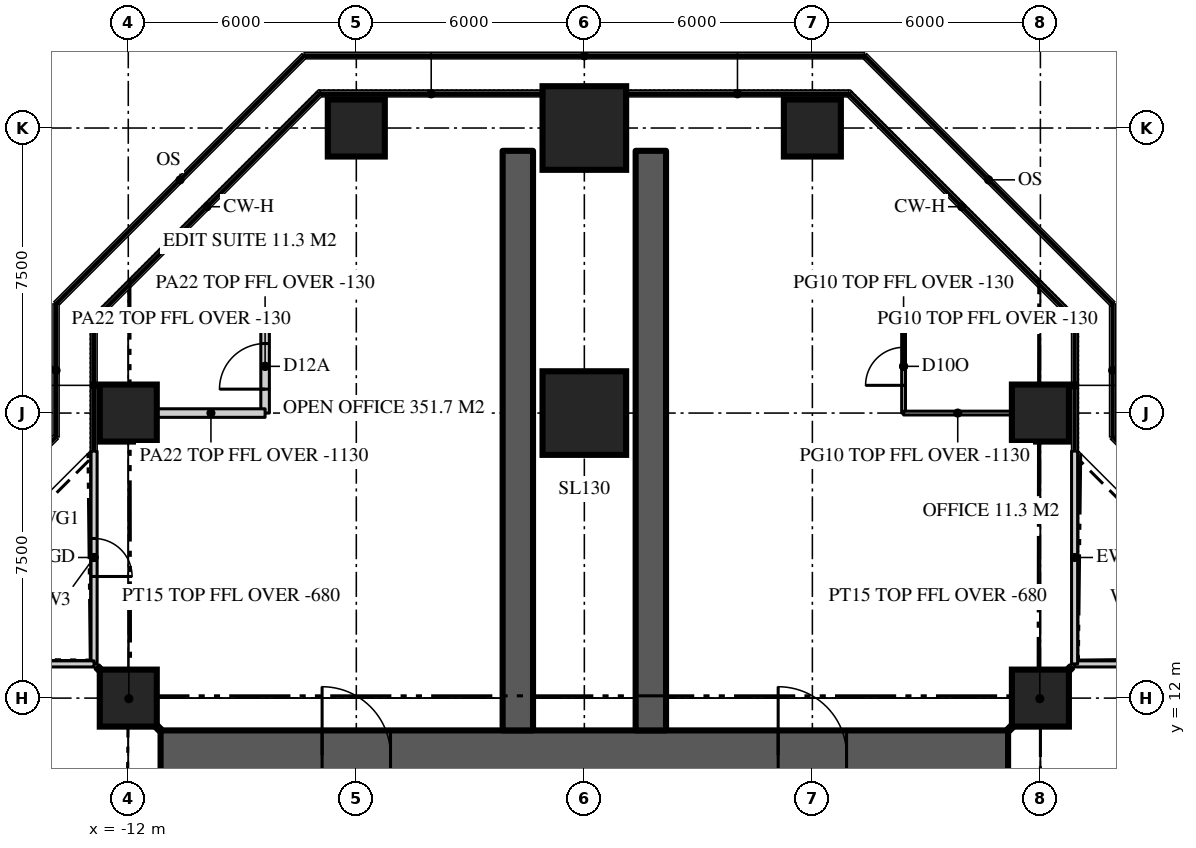
"""IFC4 building model, lengths in metres.
Left out: names, types, materials, properties, quantities, classifications, styles, units other than length and angle.
Written with IfcOpenShell. Run it as: python <this file> out.ifc"""

import sys

from ifc_helpers import new_model, si_unit, direction, frame, frame_2d, origin, origin_2d, place, context, subcontext, project, spatial, rectangle, extrude, element, fill, save


model = new_model("IFC4")
c1 = context("Model", 3, precision=1e-05, world=origin(), true_north=direction((0.0, 1.0)))
c2 = subcontext(c1, "Body", "Model", "MODEL_VIEW")
j1 = project(units=[si_unit("LENGTHUNIT", "METRE"), si_unit("PLANEANGLEUNIT", "RADIAN")], contexts=[c1])
p1 = place(None, origin())
s1 = spatial("IfcSite", under=j1, at=p1, CompositionType="ELEMENT")
p2 = place(p1, origin())
s2 = spatial("IfcBuilding", under=s1, at=p2, CompositionType="ELEMENT")
p3 = place(p2, frame((0.0, 0.0, 251.7)))
s3 = spatial("IfcBuildingStorey", under=s2, at=p3, CompositionType="ELEMENT", Elevation=251.7)
p4 = place(p3, frame((-11.15, 10.5, 0.0), z_axis=(0.0, 0.0, 1.0), x_axis=(1.0, 0.0, 0.0)))
e1 = element("IfcWall", 1, at=p4, inside=s3, PredefinedType="SHEAR", context=c2, shape_type="SweptSolid", body=[
    extrude(rectangle(XDim=22.3, YDim=1.3, at=frame_2d((11.15, 0.0))), origin(), (0.0, 0.0, 1.0), 3.9),
])
p5 = place(p4, frame((4.25, 0.0, 0.0)))
e2 = element("IfcOpeningElement", 2, at=p5, cuts=e1, PredefinedType="OPENING", context=c2, shape_type="SweptSolid", body=[
    extrude(rectangle(XDim=1.8, YDim=2.2, at=frame_2d((0.9, 1.1))), frame((0.0, 0.66, 0.0), z_axis=(0.0, -1.0, 0.0), x_axis=(1.0, 0.0, 0.0)), (0.0, 0.0, 1.0), 1.32),
])
p6 = place(p4, frame((16.25, 0.0, 0.0)))
e3 = element("IfcOpeningElement", 3, at=p6, cuts=e1, PredefinedType="OPENING", context=c2, shape_type="SweptSolid", body=[
    extrude(rectangle(XDim=1.8, YDim=2.2, at=frame_2d((0.9, 1.1))), frame((0.0, 0.66, 0.0), z_axis=(0.0, -1.0, 0.0), x_axis=(1.0, 0.0, 0.0)), (0.0, 0.0, 1.0), 1.32),
])
for number, where, z_axis, x_axis in (
    (4, (1.75, 11.15, 0.0), (0.0, 0.0, 1.0), (0.0, 1.0, 0.0)),
    (5, (-1.75, 11.15, 0.0), (0.0, 0.0, 1.0), (0.0, 1.0, 0.0)),
):
    element("IfcWall", number, at=place(p3, frame(where, z_axis=z_axis, x_axis=x_axis)), inside=s3, PredefinedType="SHEAR", context=c2, shape_type="SweptSolid", body=[
        extrude(rectangle(XDim=15.25, YDim=0.8, at=frame_2d((7.625, 0.0))), origin(), (0.0, 0.0, 1.0), 3.9),
    ])
for number, where, z_axis, x_axis in (
    (6, (-12.0, 12.0, 0.0), (0.0, 0.0, 1.0), (1.0, 0.0, 0.0)),
    (7, (12.0, 12.0, 0.0), (0.0, 0.0, 1.0), (1.0, 0.0, 0.0)),
    (8, (-12.0, 19.5, 0.0), (0.0, 0.0, 1.0), (1.0, 0.0, 0.0)),
):
    element("IfcColumn", number, at=place(p3, frame(where, z_axis=z_axis, x_axis=x_axis)), inside=s3, PredefinedType="COLUMN", context=c2, shape_type="SweptSolid", body=[
        extrude(rectangle(XDim=1.5, YDim=1.5, at=origin_2d()), origin(), (0.0, 0.0, 1.0), 3.9),
    ])
p7 = place(p3, frame((0.0, 19.5, 0.0), z_axis=(0.0, 0.0, 1.0), x_axis=(1.0, 0.0, 0.0)))
e9 = element("IfcColumn", 9, at=p7, inside=s3, PredefinedType="COLUMN", context=c2, shape_type="SweptSolid", body=[
    extrude(rectangle(XDim=2.2, YDim=2.2, at=origin_2d()), origin(), (0.0, 0.0, 1.0), 3.9),
])
for number, where, z_axis, x_axis in (
    (10, (12.0, 19.5, 0.0), (0.0, 0.0, 1.0), (1.0, 0.0, 0.0)),
    (11, (-6.0, 27.0, 0.0), (0.0, 0.0, 1.0), (1.0, 0.0, 0.0)),
):
    element("IfcColumn", number, at=place(p3, frame(where, z_axis=z_axis, x_axis=x_axis)), inside=s3, PredefinedType="COLUMN", context=c2, shape_type="SweptSolid", body=[
        extrude(rectangle(XDim=1.5, YDim=1.5, at=origin_2d()), origin(), (0.0, 0.0, 1.0), 3.9),
    ])
p8 = place(p3, frame((0.0, 27.0, 0.0), z_axis=(0.0, 0.0, 1.0), x_axis=(1.0, 0.0, 0.0)))
e12 = element("IfcColumn", 12, at=p8, inside=s3, PredefinedType="COLUMN", context=c2, shape_type="SweptSolid", body=[
    extrude(rectangle(XDim=2.2, YDim=2.2, at=origin_2d()), origin(), (0.0, 0.0, 1.0), 3.9),
])
p9 = place(p3, frame((6.0, 27.0, 0.0), z_axis=(0.0, 0.0, 1.0), x_axis=(1.0, 0.0, 0.0)))
e13 = element("IfcColumn", 13, at=p9, inside=s3, PredefinedType="COLUMN", context=c2, shape_type="SweptSolid", body=[
    extrude(rectangle(XDim=1.5, YDim=1.5, at=origin_2d()), origin(), (0.0, 0.0, 1.0), 3.9),
])
p10 = place(p3, frame((18.5, 12.9, 0.0), z_axis=(0.0, 0.0, 1.0), x_axis=(-1.0, 0.0, 0.0)))
e14 = element("IfcWall", 14, at=p10, inside=s3, PredefinedType="SOLIDWALL", context=c2, shape_type="SweptSolid", body=[
    extrude(rectangle(XDim=5.6, YDim=0.16, at=frame_2d((2.8, 0.0))), origin(), (0.0, 0.0, 1.0), 3.77),
])
p11 = place(p10, frame((2.3, 0.0, 0.0)))
e15 = element("IfcOpeningElement", 15, at=p11, cuts=e14, PredefinedType="OPENING", context=c2, shape_type="SweptSolid", body=[
    extrude(rectangle(XDim=1.0, YDim=2.2, at=frame_2d((0.5, 1.1))), frame((0.0, 0.09, 0.0), z_axis=(0.0, -1.0, 0.0), x_axis=(1.0, 0.0, 0.0)), (0.0, 0.0, 1.0), 0.18),
])
p12 = place(p3, frame((12.9, 12.9, 0.0), z_axis=(0.0, 0.0, 1.0), x_axis=(0.0, 1.0, 0.0)))
e16 = element("IfcWall", 16, at=p12, inside=s3, PredefinedType="SOLIDWALL", context=c2, shape_type="SweptSolid", body=[
    extrude(rectangle(XDim=5.6, YDim=0.16, at=frame_2d((2.8, 0.0))), origin(), (0.0, 0.0, 1.0), 3.77),
])
p13 = place(p3, frame((-12.9, 18.5, 0.0), z_axis=(0.0, 0.0, 1.0), x_axis=(0.0, -1.0, 0.0)))
e17 = element("IfcWall", 17, at=p13, inside=s3, PredefinedType="SOLIDWALL", context=c2, shape_type="SweptSolid", body=[
    extrude(rectangle(XDim=5.6, YDim=0.16, at=frame_2d((2.8, 0.0))), origin(), (0.0, 0.0, 1.0), 3.77),
])
p14 = place(p13, frame((2.3, 0.0, 0.0)))
e18 = element("IfcOpeningElement", 18, at=p14, cuts=e17, PredefinedType="OPENING", context=c2, shape_type="SweptSolid", body=[
    extrude(rectangle(XDim=1.0, YDim=2.2, at=frame_2d((0.5, 1.1))), frame((0.0, 0.09, 0.0), z_axis=(0.0, -1.0, 0.0), x_axis=(1.0, 0.0, 0.0)), (0.0, 0.0, 1.0), 0.18),
])
p15 = place(p3, frame((-12.9, 12.9, 0.0), z_axis=(0.0, 0.0, 1.0), x_axis=(-1.0, 0.0, 0.0)))
e19 = element("IfcWall", 19, at=p15, inside=s3, PredefinedType="SOLIDWALL", context=c2, shape_type="SweptSolid", body=[
    extrude(rectangle(XDim=5.6, YDim=0.16, at=frame_2d((2.8, 0.0))), origin(), (0.0, 0.0, 1.0), 3.77),
])
p16 = place(p3, frame((-8.4, 19.5, 0.0), z_axis=(0.0, 0.0, 1.0), x_axis=(0.0, 1.0, 0.0)))
e20 = element("IfcWall", 20, at=p16, inside=s3, PredefinedType="PARTITIONING", context=c2, shape_type="SweptSolid", body=[
    extrude(rectangle(XDim=2.459, YDim=0.225, at=frame_2d((1.229, 0.0))), origin(), (0.0, 0.0, 1.0), 3.77),
])
p17 = place(p16, frame((0.629, 0.0, 0.0)))
e21 = element("IfcOpeningElement", 21, at=p17, cuts=e20, PredefinedType="OPENING", context=c2, shape_type="SweptSolid", body=[
    extrude(rectangle(XDim=1.2, YDim=2.2, at=frame_2d((0.6, 1.1))), frame((0.0, 0.123, 0.0), z_axis=(0.0, -1.0, 0.0), x_axis=(1.0, 0.0, 0.0)), (0.0, 0.0, 1.0), 0.245),
])
p18 = place(p3, frame((-8.4, 19.5, 0.0), z_axis=(0.0, 0.0, 1.0), x_axis=(-1.0, 0.0, 0.0)))
e22 = element("IfcWall", 22, at=p18, inside=s3, PredefinedType="PARTITIONING", context=c2, shape_type="SweptSolid", body=[
    extrude(rectangle(XDim=2.85, YDim=0.225, at=frame_2d((1.425, 0.0))), origin(), (0.0, 0.0, 1.0), 2.77),
])
p19 = place(p3, frame((-8.4, 21.959, 0.0), z_axis=(0.0, 0.0, 1.0), x_axis=(-1.0, 0.0, 0.0)))
e23 = element("IfcWall", 23, at=p19, inside=s3, PredefinedType="PARTITIONING", context=c2, shape_type="SweptSolid", body=[
    extrude(rectangle(XDim=4.42, YDim=0.225, at=frame_2d((2.21, 0.0))), origin(), (0.0, 0.0, 1.0), 3.77),
])
p20 = place(p3, frame((8.4, 19.5, 0.0), z_axis=(0.0, 0.0, 1.0), x_axis=(0.0, 1.0, 0.0)))
e24 = element("IfcWall", 24, at=p20, inside=s3, PredefinedType="PARTITIONING", context=c2, shape_type="SweptSolid", body=[
    extrude(rectangle(XDim=2.459, YDim=0.1, at=frame_2d((1.229, 0.0))), origin(), (0.0, 0.0, 1.0), 3.77),
])
p21 = place(p20, frame((0.729, 0.0, 0.0)))
e25 = element("IfcOpeningElement", 25, at=p21, cuts=e24, PredefinedType="OPENING", context=c2, shape_type="SweptSolid", body=[
    extrude(rectangle(XDim=1.0, YDim=2.2, at=frame_2d((0.5, 1.1))), frame((0.0, 0.06, 0.0), z_axis=(0.0, -1.0, 0.0), x_axis=(1.0, 0.0, 0.0)), (0.0, 0.0, 1.0), 0.12),
])
p22 = place(p3, frame((8.4, 19.5, 0.0), z_axis=(0.0, 0.0, 1.0), x_axis=(1.0, 0.0, 0.0)))
e26 = element("IfcWall", 26, at=p22, inside=s3, PredefinedType="PARTITIONING", context=c2, shape_type="SweptSolid", body=[
    extrude(rectangle(XDim=2.85, YDim=0.1, at=frame_2d((1.425, 0.0))), origin(), (0.0, 0.0, 1.0), 2.77),
])
p23 = place(p3, frame((8.4, 21.959, 0.0), z_axis=(0.0, 0.0, 1.0), x_axis=(1.0, 0.0, 0.0)))
e27 = element("IfcWall", 27, at=p23, inside=s3, PredefinedType="PARTITIONING", context=c2, shape_type="SweptSolid", body=[
    extrude(rectangle(XDim=4.42, YDim=0.1, at=frame_2d((2.21, 0.0))), origin(), (0.0, 0.0, 1.0), 3.77),
])
for number, where, z_axis, x_axis in (
    (28, (11.15, 11.15, 0.0), (0.0, 0.0, 1.0), (0.707, 0.707, 0.0)),
    (29, (-11.15, 11.15, 0.0), (0.0, 0.0, 1.0), (-0.707, 0.707, 0.0)),
):
    element("IfcWall", number, at=place(p3, frame(where, z_axis=z_axis, x_axis=x_axis)), inside=s3, PredefinedType="PARTITIONING", context=c2, shape_type="SweptSolid", body=[
        extrude(rectangle(XDim=2.362, YDim=0.15, at=frame_2d((1.181, 0.0))), origin(), (0.0, 0.0, 1.0), 3.22),
    ])
p24 = place(p14, origin())
e30 = element("IfcDoor", 30, at=p24, inside=s3, OperationType="SINGLE_SWING_RIGHT", PredefinedType="DOOR", context=c2, shape_type="SweptSolid", body=[
    extrude(rectangle(XDim=1.0, YDim=2.2, at=frame_2d((0.5, 1.1))), frame((0.0, 0.025, 0.0), z_axis=(0.0, -1.0, 0.0), x_axis=(1.0, 0.0, 0.0)), (0.0, 0.0, 1.0), 0.05),
])
fill(e18, e30)
p25 = place(p5, origin())
e31 = element("IfcDoor", 31, at=p25, inside=s3, OperationType="DOUBLE_DOOR_DOUBLE_SWING", PredefinedType="DOOR", context=c2, shape_type="SweptSolid", body=[
    extrude(rectangle(XDim=1.8, YDim=2.2, at=frame_2d((0.9, 1.1))), frame((0.0, 0.025, 0.0), z_axis=(0.0, -1.0, 0.0), x_axis=(1.0, 0.0, 0.0)), (0.0, 0.0, 1.0), 0.05),
])
fill(e2, e31)
p26 = place(p6, origin())
e32 = element("IfcDoor", 32, at=p26, inside=s3, OperationType="DOUBLE_DOOR_DOUBLE_SWING", PredefinedType="DOOR", context=c2, shape_type="SweptSolid", body=[
    extrude(rectangle(XDim=1.8, YDim=2.2, at=frame_2d((0.9, 1.1))), frame((0.0, 0.025, 0.0), z_axis=(0.0, -1.0, 0.0), x_axis=(1.0, 0.0, 0.0)), (0.0, 0.0, 1.0), 0.05),
])
fill(e3, e32)
p27 = place(p17, origin())
e33 = element("IfcDoor", 33, at=p27, inside=s3, OperationType="SINGLE_SWING_LEFT", PredefinedType="DOOR", context=c2, shape_type="SweptSolid", body=[
    extrude(rectangle(XDim=1.2, YDim=2.2, at=frame_2d((0.6, 1.1))), frame((0.0, 0.025, 0.0), z_axis=(0.0, -1.0, 0.0), x_axis=(1.0, 0.0, 0.0)), (0.0, 0.0, 1.0), 0.05),
])
fill(e21, e33)
p28 = place(p21, origin())
e34 = element("IfcDoor", 34, at=p28, inside=s3, OperationType="SINGLE_SWING_LEFT", PredefinedType="DOOR", context=c2, shape_type="SweptSolid", body=[
    extrude(rectangle(XDim=1.0, YDim=2.2, at=frame_2d((0.5, 1.1))), frame((0.0, 0.025, 0.0), z_axis=(0.0, -1.0, 0.0), x_axis=(1.0, 0.0, 0.0)), (0.0, 0.0, 1.0), 0.05),
])
fill(e25, e34)
save(model, sys.argv[1])
